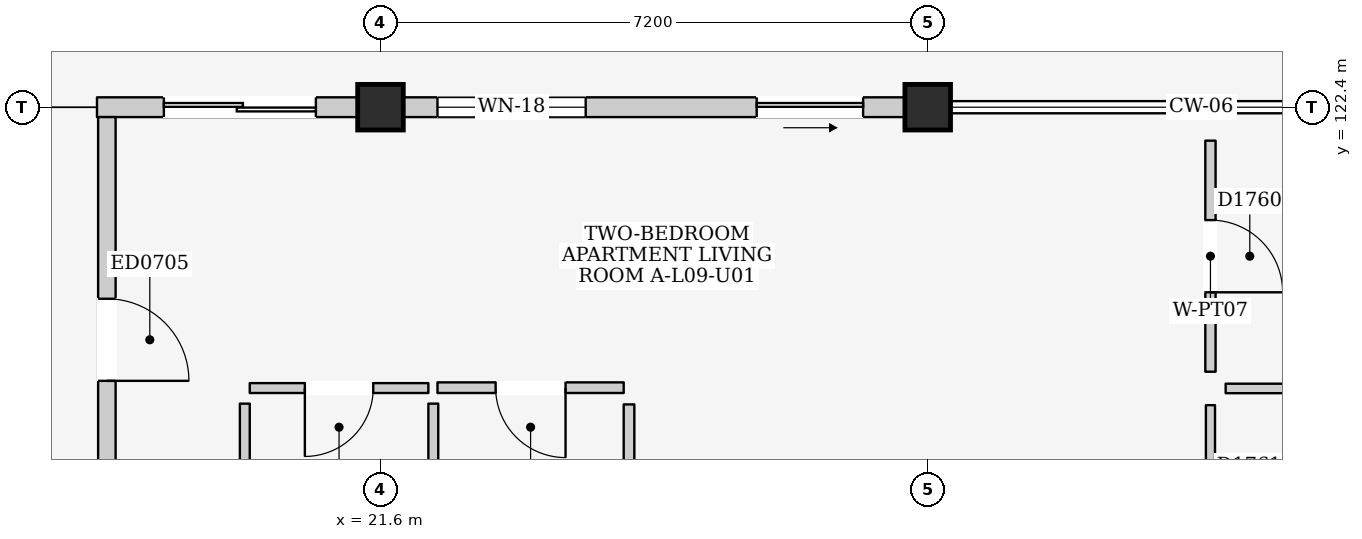
"""IFC4 building model, lengths in metres.
Left out: names, types, materials, properties, quantities, classifications, styles, units other than length and angle.
Written with IfcOpenShell. Run it as: python <this file> out.ifc"""

import sys

from ifc_helpers import new_model, si_unit, direction, frame, frame_2d, origin, origin_2d, place, context, subcontext, project, spatial, rectangle, extrude, element, fill, save


model = new_model("IFC4")
c1 = context("Model", 3, precision=1e-05, world=origin(), true_north=direction((0.0, 1.0)))
c2 = subcontext(c1, "Body", "Model", "MODEL_VIEW")
j1 = project(units=[si_unit("LENGTHUNIT", "METRE"), si_unit("PLANEANGLEUNIT", "RADIAN")], contexts=[c1])
p1 = place(None, origin())
s1 = spatial("IfcSite", under=j1, at=p1, CompositionType="ELEMENT")
p2 = place(p1, origin())
s2 = spatial("IfcBuilding", under=s1, at=p2, CompositionType="ELEMENT")
p3 = place(p2, frame((0.0, 0.0, 31.5)))
s3 = spatial("IfcBuildingStorey", under=s2, at=p3, CompositionType="ELEMENT", Elevation=31.5)
for number, where, z_axis, x_axis in (
    (1, (21.6, 122.4, 0.0), (0.0, 0.0, 1.0), (1.0, 0.0, 0.0)),
    (2, (28.8, 122.4, 0.0), (0.0, 0.0, 1.0), (1.0, 0.0, 0.0)),
):
    element("IfcColumn", number, at=place(p3, frame(where, z_axis=z_axis, x_axis=x_axis)), inside=s3, PredefinedType="COLUMN", context=c2, shape_type="SweptSolid", body=[
        extrude(rectangle(XDim=0.6, YDim=0.6, at=origin_2d()), origin(), (0.0, 0.0, 1.0), 3.3),
    ])
p4 = place(p3, frame((17.87, 122.4, 0.0), z_axis=(0.0, 0.0, 1.0), x_axis=(1.0, 0.0, 0.0)))
e3 = element("IfcWall", 3, at=p4, inside=s3, PredefinedType="ELEMENTEDWALL", context=c2, shape_type="SweptSolid", body=[
    extrude(rectangle(XDim=3.43, YDim=0.26, at=frame_2d((1.715, 0.0))), origin(), (0.0, 0.0, 1.0), 2.415),
])
p5 = place(p4, frame((0.88, 0.0, 0.0)))
e4 = element("IfcOpeningElement", 4, at=p5, cuts=e3, PredefinedType="OPENING", context=c2, shape_type="SweptSolid", body=[
    extrude(rectangle(XDim=2.0, YDim=2.12, at=frame_2d((1.0, 1.06))), frame((0.0, 0.145, 0.0), z_axis=(0.0, -1.0, 0.0), x_axis=(1.0, 0.0, 0.0)), (0.0, 0.0, 1.0), 0.29),
])
p6 = place(p3, frame((21.9, 122.4, 0.0), z_axis=(0.0, 0.0, 1.0), x_axis=(1.0, 0.0, 0.0)))
e5 = element("IfcWall", 5, at=p6, inside=s3, PredefinedType="ELEMENTEDWALL", context=c2, shape_type="SweptSolid", body=[
    extrude(rectangle(XDim=6.6, YDim=0.26, at=frame_2d((3.3, 0.0))), origin(), (0.0, 0.0, 1.0), 2.615),
])
p7 = place(p6, frame((4.65, 0.0, 0.0)))
e6 = element("IfcOpeningElement", 6, at=p7, cuts=e5, PredefinedType="OPENING", context=c2, shape_type="SweptSolid", body=[
    extrude(rectangle(XDim=1.4, YDim=2.1, at=frame_2d((0.7, 1.05))), frame((0.0, 0.145, 0.0), z_axis=(0.0, -1.0, 0.0), x_axis=(1.0, 0.0, 0.0)), (0.0, 0.0, 1.0), 0.29),
])
p8 = place(p6, frame((0.45, 0.0, 0.9)))
e7 = element("IfcOpeningElement", 7, at=p8, cuts=e5, PredefinedType="OPENING", context=c2, shape_type="SweptSolid", body=[
    extrude(rectangle(XDim=1.95, YDim=1.55, at=frame_2d((0.975, 0.775))), frame((0.0, 0.145, 0.0), z_axis=(0.0, -1.0, 0.0), x_axis=(1.0, 0.0, 0.0)), (0.0, 0.0, 1.0), 0.29),
])
p9 = place(p3, frame((18.0, 115.2, 0.0), z_axis=(0.0, 0.0, 1.0), x_axis=(0.0, 1.0, 0.0)))
e8 = element("IfcWall", 8, at=p9, inside=s3, PredefinedType="ELEMENTEDWALL", context=c2, shape_type="SweptSolid", body=[
    extrude(rectangle(XDim=7.07, YDim=0.23, at=frame_2d((3.535, 0.0))), origin(), (0.0, 0.0, 1.0), 2.515),
])
p10 = place(p9, frame((3.6, 0.0, 0.0)))
e9 = element("IfcOpeningElement", 9, at=p10, cuts=e8, PredefinedType="OPENING", context=c2, shape_type="SweptSolid", body=[
    extrude(rectangle(XDim=1.08, YDim=2.12, at=frame_2d((0.54, 1.06))), frame((0.0, 0.13, 0.0), z_axis=(0.0, -1.0, 0.0), x_axis=(1.0, 0.0, 0.0)), (0.0, 0.0, 1.0), 0.26),
])
p11 = place(p3, frame((19.88, 118.705, 0.0), z_axis=(0.0, 0.0, 1.0), x_axis=(1.0, 0.0, 0.0)))
e10 = element("IfcWall", 10, at=p11, inside=s3, PredefinedType="PARTITIONING", context=c2, shape_type="SweptSolid", body=[
    extrude(rectangle(XDim=2.35, YDim=0.13, at=frame_2d((1.175, 0.0))), origin(), (0.0, 0.0, 1.0), 3.08),
])
p12 = place(p11, frame((0.725, 0.0, 0.0)))
e11 = element("IfcOpeningElement", 11, at=p12, cuts=e10, PredefinedType="OPENING", context=c2, shape_type="SweptSolid", body=[
    extrude(rectangle(XDim=0.9, YDim=2.1, at=frame_2d((0.45, 1.05))), frame((0.0, 0.08, 0.0), z_axis=(0.0, -1.0, 0.0), x_axis=(1.0, 0.0, 0.0)), (0.0, 0.0, 1.0), 0.16),
])
for number, where, z_axis, x_axis in (
    (12, (22.295, 115.46, 0.0), (0.0, 0.0, 1.0), (0.0, 1.0, 0.0)),
    (13, (19.815, 115.46, 0.0), (0.0, 0.0, 1.0), (0.0, 1.0, 0.0)),
):
    element("IfcWall", number, at=place(p3, frame(where, z_axis=z_axis, x_axis=x_axis)), inside=s3, PredefinedType="PARTITIONING", context=c2, shape_type="SweptSolid", body=[
        extrude(rectangle(XDim=3.04, YDim=0.13, at=frame_2d((1.52, 0.0))), origin(), (0.0, 0.0, 1.0), 3.08),
    ])
p13 = place(p3, frame((22.35, 118.71, 0.0), z_axis=(0.0, 0.0, 1.0), x_axis=(1.0, 0.0, 0.0)))
e14 = element("IfcWall", 14, at=p13, inside=s3, PredefinedType="PARTITIONING", context=c2, shape_type="SweptSolid", body=[
    extrude(rectangle(XDim=2.45, YDim=0.14, at=frame_2d((1.225, 0.0))), origin(), (0.0, 0.0, 1.0), 3.08),
])
p14 = place(p13, frame((0.765, 0.0, 0.0)))
e15 = element("IfcOpeningElement", 15, at=p14, cuts=e14, PredefinedType="OPENING", context=c2, shape_type="SweptSolid", body=[
    extrude(rectangle(XDim=0.92, YDim=2.1, at=frame_2d((0.46, 1.05))), frame((0.0, 0.085, 0.0), z_axis=(0.0, -1.0, 0.0), x_axis=(1.0, 0.0, 0.0)), (0.0, 0.0, 1.0), 0.17),
])
p15 = place(p3, frame((24.87, 115.43, 0.0), z_axis=(0.0, 0.0, 1.0), x_axis=(0.0, 1.0, 0.0)))
e16 = element("IfcWall", 16, at=p15, inside=s3, PredefinedType="PARTITIONING", context=c2, shape_type="SweptSolid", body=[
    extrude(rectangle(XDim=3.06, YDim=0.14, at=frame_2d((1.53, 0.0))), origin(), (0.0, 0.0, 1.0), 3.08),
])
p16 = place(p3, frame((32.52, 118.92, 0.0), z_axis=(0.0, 0.0, 1.0), x_axis=(0.0, 1.0, 0.0)))
e17 = element("IfcWall", 17, at=p16, inside=s3, PredefinedType="PARTITIONING", context=c2, shape_type="SweptSolid", body=[
    extrude(rectangle(XDim=3.04, YDim=0.135, at=frame_2d((1.52, 0.0))), origin(), (0.0, 0.0, 1.0), 3.08),
])
p17 = place(p16, frame((1.045, 0.0, 0.0)))
e18 = element("IfcOpeningElement", 18, at=p17, cuts=e17, PredefinedType="OPENING", context=c2, shape_type="SweptSolid", body=[
    extrude(rectangle(XDim=0.95, YDim=2.15, at=frame_2d((0.475, 1.075))), frame((0.0, 0.083, 0.0), z_axis=(0.0, -1.0, 0.0), x_axis=(1.0, 0.0, 0.0)), (0.0, 0.0, 1.0), 0.165),
])
p18 = place(p3, frame((32.72, 118.7, 0.0), z_axis=(0.0, 0.0, 1.0), x_axis=(1.0, 0.0, 0.0)))
e19 = element("IfcWall", 19, at=p18, inside=s3, PredefinedType="PARTITIONING", context=c2, shape_type="SweptSolid", body=[
    extrude(rectangle(XDim=3.06, YDim=0.125, at=frame_2d((1.53, 0.0))), origin(), (0.0, 0.0, 1.0), 3.08),
])
p19 = place(p3, frame((32.52, 115.44, 0.0), z_axis=(0.0, 0.0, 1.0), x_axis=(0.0, 1.0, 0.0)))
e20 = element("IfcWall", 20, at=p19, inside=s3, PredefinedType="PARTITIONING", context=c2, shape_type="SweptSolid", body=[
    extrude(rectangle(XDim=3.04, YDim=0.12, at=frame_2d((1.52, 0.0))), origin(), (0.0, 0.0, 1.0), 3.08),
])
p20 = place(p19, frame((1.04, 0.0, 0.0)))
e21 = element("IfcOpeningElement", 21, at=p20, cuts=e20, PredefinedType="OPENING", context=c2, shape_type="SweptSolid", body=[
    extrude(rectangle(XDim=0.96, YDim=2.15, at=frame_2d((0.48, 1.075))), frame((0.0, 0.075, 0.0), z_axis=(0.0, -1.0, 0.0), x_axis=(1.0, 0.0, 0.0)), (0.0, 0.0, 1.0), 0.15),
])
p21 = place(p5, frame((2.0, 0.0, 0.0), z_axis=(0.0, 0.0, 1.0), x_axis=(-1.0, 0.0, 0.0)))
e22 = element("IfcDoor", 22, at=p21, inside=s3, OperationType="DOUBLE_DOOR_SLIDING", PredefinedType="DOOR", context=c2, shape_type="SweptSolid", body=[
    extrude(rectangle(XDim=2.0, YDim=2.12, at=frame_2d((1.0, 1.06))), frame((0.0, 0.025, 0.0), z_axis=(0.0, -1.0, 0.0), x_axis=(1.0, 0.0, 0.0)), (0.0, 0.0, 1.0), 0.05),
])
fill(e4, e22)
p22 = place(p7, frame((1.4, 0.0, 0.0), z_axis=(0.0, 0.0, 1.0), x_axis=(-1.0, 0.0, 0.0)))
e23 = element("IfcDoor", 23, at=p22, inside=s3, OperationType="SLIDING_TO_RIGHT", PredefinedType="DOOR", context=c2, shape_type="SweptSolid", body=[
    extrude(rectangle(XDim=1.4, YDim=2.1, at=frame_2d((0.7, 1.05))), frame((0.0, 0.025, 0.0), z_axis=(0.0, -1.0, 0.0), x_axis=(1.0, 0.0, 0.0)), (0.0, 0.0, 1.0), 0.05),
])
fill(e6, e23)
p23 = place(p8, origin())
e24 = element("IfcWindow", 24, at=p23, inside=s3, PartitioningType="DOUBLE_PANEL_VERTICAL", PredefinedType="WINDOW", context=c2, shape_type="SweptSolid", body=[
    extrude(rectangle(XDim=1.95, YDim=1.55, at=frame_2d((0.975, 0.775))), frame((0.0, 0.03, 0.0), z_axis=(0.0, -1.0, 0.0), x_axis=(1.0, 0.0, 0.0)), (0.0, 0.0, 1.0), 0.06),
])
fill(e7, e24)
p24 = place(p10, frame((1.08, 0.0, 0.0), z_axis=(0.0, 0.0, 1.0), x_axis=(-1.0, 0.0, 0.0)))
e25 = element("IfcDoor", 25, at=p24, inside=s3, OperationType="SINGLE_SWING_RIGHT", PredefinedType="DOOR", context=c2, shape_type="SweptSolid", body=[
    extrude(rectangle(XDim=1.08, YDim=2.12, at=frame_2d((0.54, 1.06))), frame((0.0, 0.025, 0.0), z_axis=(0.0, -1.0, 0.0), x_axis=(1.0, 0.0, 0.0)), (0.0, 0.0, 1.0), 0.05),
])
fill(e9, e25)
p25 = place(p12, frame((0.9, 0.0, 0.0), z_axis=(0.0, 0.0, 1.0), x_axis=(-1.0, 0.0, 0.0)))
e26 = element("IfcDoor", 26, at=p25, inside=s3, OperationType="SINGLE_SWING_RIGHT", PredefinedType="DOOR", context=c2, shape_type="SweptSolid", body=[
    extrude(rectangle(XDim=0.9, YDim=2.1, at=frame_2d((0.45, 1.05))), frame((0.0, 0.025, 0.0), z_axis=(0.0, -1.0, 0.0), x_axis=(1.0, 0.0, 0.0)), (0.0, 0.0, 1.0), 0.05),
])
fill(e11, e26)
p26 = place(p14, frame((0.92, 0.0, 0.0), z_axis=(0.0, 0.0, 1.0), x_axis=(-1.0, 0.0, 0.0)))
e27 = element("IfcDoor", 27, at=p26, inside=s3, OperationType="SINGLE_SWING_LEFT", PredefinedType="DOOR", context=c2, shape_type="SweptSolid", body=[
    extrude(rectangle(XDim=0.92, YDim=2.1, at=frame_2d((0.46, 1.05))), frame((0.0, 0.025, 0.0), z_axis=(0.0, -1.0, 0.0), x_axis=(1.0, 0.0, 0.0)), (0.0, 0.0, 1.0), 0.05),
])
fill(e15, e27)
p27 = place(p17, frame((0.95, 0.0, 0.0), z_axis=(0.0, 0.0, 1.0), x_axis=(-1.0, 0.0, 0.0)))
e28 = element("IfcDoor", 28, at=p27, inside=s3, OperationType="SINGLE_SWING_RIGHT", PredefinedType="DOOR", context=c2, shape_type="SweptSolid", body=[
    extrude(rectangle(XDim=0.95, YDim=2.15, at=frame_2d((0.475, 1.075))), frame((0.0, 0.025, 0.0), z_axis=(0.0, -1.0, 0.0), x_axis=(1.0, 0.0, 0.0)), (0.0, 0.0, 1.0), 0.05),
])
fill(e18, e28)
save(model, sys.argv[1])
